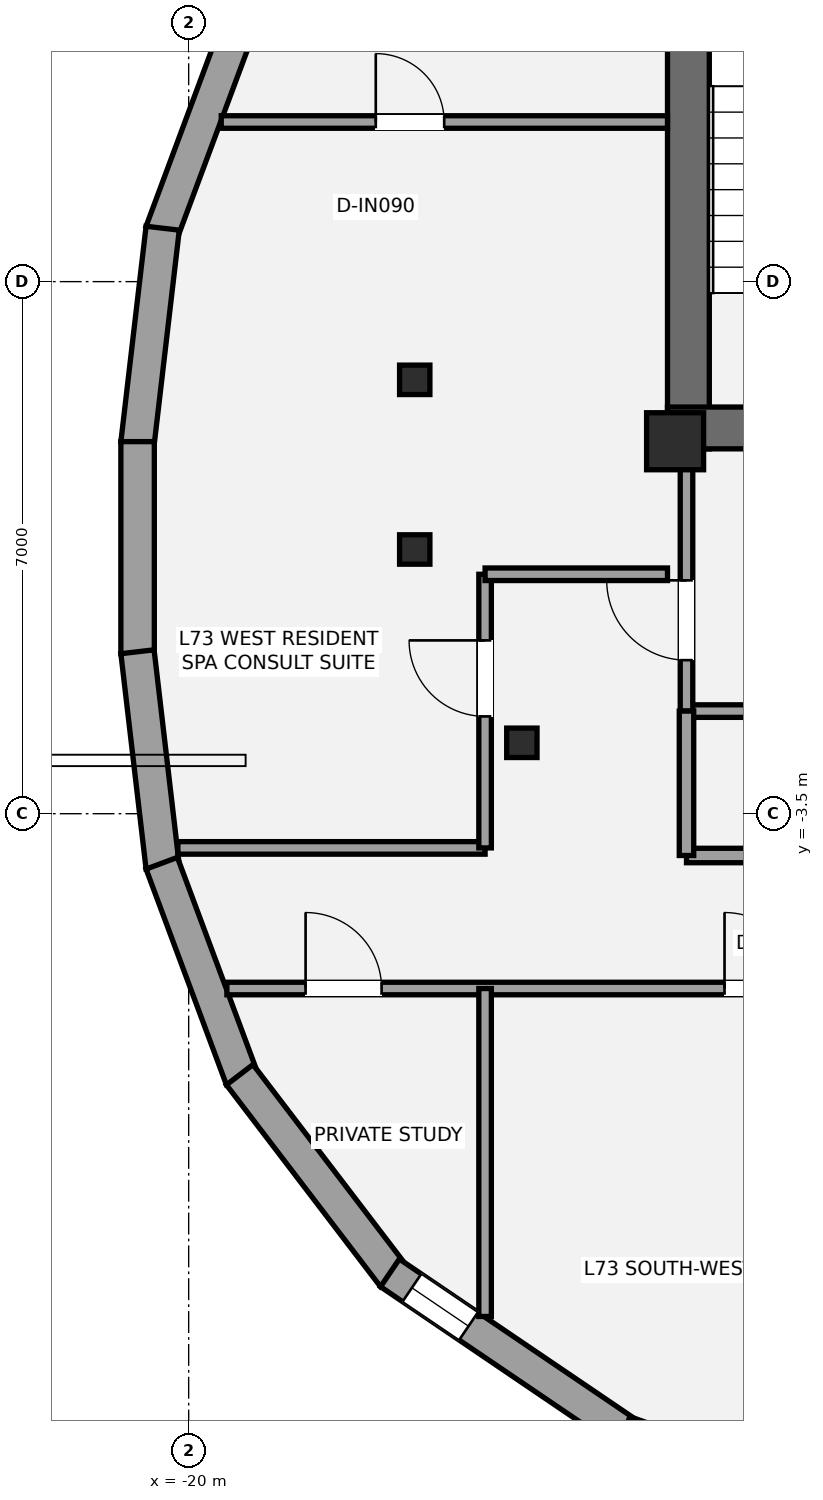
"""IFC4 building model, lengths in metres.
Left out: names, types, materials, properties, quantities, classifications, styles, units other than length and angle.
Written with IfcOpenShell. Run it as: python <this file> out.ifc"""

import sys

from ifc_helpers import new_model, si_unit, direction, frame, frame_2d, origin, origin_2d, place, context, subcontext, project, spatial, rectangle, i_section, extrude, element, fill, save


model = new_model("IFC4")
c1 = context("Model", 3, precision=1e-05, world=origin(), true_north=direction((0.0, 1.0)))
c2 = subcontext(c1, "Body", "Model", "MODEL_VIEW")
j1 = project(units=[si_unit("LENGTHUNIT", "METRE"), si_unit("PLANEANGLEUNIT", "RADIAN")], contexts=[c1])
p1 = place(None, origin())
s1 = spatial("IfcSite", under=j1, at=p1, CompositionType="ELEMENT")
p2 = place(p1, origin())
s2 = spatial("IfcBuilding", under=s1, at=p2, CompositionType="ELEMENT")
p3 = place(p2, frame((0.0, 0.0, 257.25)))
s3 = spatial("IfcBuildingStorey", under=s2, at=p3, CompositionType="ELEMENT", Elevation=257.25)
p4 = place(p3, frame((-13.425, 1.3, 0.0), z_axis=(0.0, 0.0, 1.0), x_axis=(0.0, 1.0, 0.0)))
e1 = element("IfcWall", 1, at=p4, inside=s3, PredefinedType="SHEAR", context=c2, shape_type="SweptSolid", body=[
    extrude(rectangle(XDim=8.25, YDim=0.55, at=frame_2d((4.125, 0.0))), origin(), (0.0, 0.0, 1.0), 3.15),
])
p5 = place(p3, frame((-4.925, 1.575, 0.0), z_axis=(0.0, 0.0, 1.0), x_axis=(-1.0, 0.0, 0.0)))
e2 = element("IfcWall", 2, at=p5, inside=s3, PredefinedType="SHEAR", context=c2, shape_type="SweptSolid", body=[
    extrude(rectangle(XDim=8.775, YDim=0.55, at=frame_2d((4.387, 0.0))), origin(), (0.0, 0.0, 1.0), 3.15),
])
p6 = place(p5, frame((5.375, 0.0, 0.0)))
e3 = element("IfcOpeningElement", 3, at=p6, cuts=e2, PredefinedType="OPENING", context=c2, shape_type="SweptSolid", body=[
    extrude(rectangle(XDim=1.05, YDim=2.15, at=frame_2d((0.525, 1.075))), frame((0.0, 0.285, 0.0), z_axis=(0.0, -1.0, 0.0), x_axis=(1.0, 0.0, 0.0)), (0.0, 0.0, 1.0), 0.57),
])
p7 = place(p5, frame((3.705, 0.0, 0.0)))
e4 = element("IfcOpeningElement", 4, at=p7, cuts=e2, PredefinedType="OPENING", context=c2, shape_type="SweptSolid", body=[
    extrude(rectangle(XDim=1.1, YDim=2.2, at=frame_2d((0.55, 1.1))), frame((0.0, 0.285, 0.0), z_axis=(0.0, -1.0, 0.0), x_axis=(1.0, 0.0, 0.0)), (0.0, 0.0, 1.0), 0.57),
])
p8 = place(p3, frame((-13.6, 1.4, 0.0), z_axis=(0.0, 0.0, 1.0), x_axis=(1.0, 0.0, 0.0)))
e5 = element("IfcColumn", 5, at=p8, inside=s3, PredefinedType="PILASTER", context=c2, shape_type="SweptSolid", body=[
    extrude(rectangle(XDim=0.75, YDim=0.75, at=origin_2d()), origin(), (0.0, 0.0, 1.0), 3.15),
])
for number, where, z_axis, x_axis in (
    (6, (-17.026, 2.208, 0.0), (0.0, 0.0, 1.0), (1.0, 0.0, 0.0)),
    (7, (-17.026, -0.024, 0.0), (0.0, 0.0, 1.0), (1.0, 0.0, 0.0)),
    (8, (-15.616, -2.567, 0.0), (0.0, 0.0, 1.0), (1.0, 0.0, 0.0)),
):
    element("IfcColumn", number, at=place(p3, frame(where, z_axis=z_axis, x_axis=x_axis)), inside=s3, PredefinedType="COLUMN", context=c2, shape_type="SweptSolid", body=[
        extrude(i_section(OverallWidth=0.399, OverallDepth=0.387, WebThickness=0.021, FlangeThickness=0.033, at=origin_2d()), origin(), (0.0, 0.0, 1.0), 3.15),
    ])
p9 = place(p3, frame((-20.354, 4.152, 0.0), z_axis=(0.0, 0.0, 1.0), x_axis=(0.34898554078, 0.937128108813, 0.0)))
e9 = element("IfcWall", 9, at=p9, inside=s3, PredefinedType="STANDARD", context=c2, shape_type="SweptSolid", body=[
    extrude(rectangle(XDim=3.03, YDim=0.44, at=frame_2d((1.515, 0.0))), origin(), (0.0, 0.0, 1.0), 2.296),
])
p10 = place(p3, frame((-20.674, 1.369, 0.0), z_axis=(0.0, 0.0, 1.0), x_axis=(0.116300017341, 0.99321412896, 0.0)))
e10 = element("IfcWall", 10, at=p10, inside=s3, PredefinedType="STANDARD", context=c2, shape_type="SweptSolid", body=[
    extrude(rectangle(XDim=2.853, YDim=0.44, at=frame_2d((1.426, 0.0))), origin(), (0.0, 0.0, 1.0), 2.296),
])
p11 = place(p3, frame((-20.672, -1.395, 0.0), z_axis=(0.0, 0.0, 1.0), x_axis=(0.0, 1.0, 0.0)))
e11 = element("IfcWall", 11, at=p11, inside=s3, PredefinedType="STANDARD", context=c2, shape_type="SweptSolid", body=[
    extrude(rectangle(XDim=2.79, YDim=0.44, at=frame_2d((1.395, 0.0))), origin(), (0.0, 0.0, 1.0), 2.296),
])
p12 = place(p3, frame((-20.342, -4.203, 0.0), z_axis=(0.0, 0.0, 1.0), x_axis=(-0.116300017341, 0.99321412896, 0.0)))
e12 = element("IfcWall", 12, at=p12, inside=s3, PredefinedType="STANDARD", context=c2, shape_type="SweptSolid", body=[
    extrude(rectangle(XDim=2.853, YDim=0.44, at=frame_2d((1.426, 0.0))), origin(), (0.0, 0.0, 1.0), 2.296),
])
p13 = place(p3, frame((-19.297, -6.991, 0.0), z_axis=(0.0, 0.0, 1.0), x_axis=(-0.34898554078, 0.937128108813, 0.0)))
e13 = element("IfcWall", 13, at=p13, inside=s3, PredefinedType="STANDARD", context=c2, shape_type="SweptSolid", body=[
    extrude(rectangle(XDim=3.03, YDim=0.44, at=frame_2d((1.515, 0.0))), origin(), (0.0, 0.0, 1.0), 2.296),
])
p14 = place(p3, frame((-17.301, -9.59, 0.0), z_axis=(0.0, 0.0, 1.0), x_axis=(-0.606828844818, 0.794832531479, 0.0)))
e14 = element("IfcWall", 14, at=p14, inside=s3, PredefinedType="STANDARD", context=c2, shape_type="SweptSolid", body=[
    extrude(rectangle(XDim=3.341, YDim=0.44, at=frame_2d((1.671, 0.0))), origin(), (0.0, 0.0, 1.0), 2.296),
])
p15 = place(p3, frame((-14.218, -11.666, 0.0), z_axis=(0.0, 0.0, 1.0), x_axis=(-0.827669406477, 0.561215959842, 0.0)))
e15 = element("IfcWall", 15, at=p15, inside=s3, PredefinedType="STANDARD", context=c2, shape_type="SweptSolid", body=[
    extrude(rectangle(XDim=3.786, YDim=0.44, at=frame_2d((1.893, 0.0))), origin(), (0.0, 0.0, 1.0), 2.296),
])
p16 = place(p15, frame((2.537, 0.0, 0.58)))
e16 = element("IfcOpeningElement", 16, at=p16, cuts=e15, PredefinedType="OPENING", context=c2, shape_type="SweptSolid", body=[
    extrude(rectangle(XDim=0.9, YDim=1.35, at=frame_2d((0.45, 0.675))), frame((0.0, 0.23, 0.0), z_axis=(0.0, -1.0, 0.0), x_axis=(1.0, 0.0, 0.0)), (0.0, 0.0, 1.0), 0.46),
])
p17 = place(p3, frame((-10.352, -13.015, 0.0), z_axis=(0.0, 0.0, 1.0), x_axis=(-0.943571934891, 0.331167636834, 0.0)))
e17 = element("IfcWall", 17, at=p17, inside=s3, PredefinedType="STANDARD", context=c2, shape_type="SweptSolid", body=[
    extrude(rectangle(XDim=4.151, YDim=0.44, at=frame_2d((2.076, 0.0))), origin(), (0.0, 0.0, 1.0), 2.296),
])
p18 = place(p17, frame((2.805, 0.0, 0.58)))
e18 = element("IfcOpeningElement", 18, at=p18, cuts=e17, PredefinedType="OPENING", context=c2, shape_type="SweptSolid", body=[
    extrude(rectangle(XDim=0.9, YDim=1.35, at=frame_2d((0.45, 0.675))), frame((0.0, 0.23, 0.0), z_axis=(0.0, -1.0, 0.0), x_axis=(1.0, 0.0, 0.0)), (0.0, 0.0, 1.0), 0.46),
])
p19 = place(p3, frame((-13.45, -2.15, 0.0), z_axis=(0.0, 0.0, 1.0), x_axis=(1.0, 0.0, 0.0)))
e19 = element("IfcWall", 19, at=p19, inside=s3, PredefinedType="PARTITIONING", context=c2, shape_type="SweptSolid", body=[
    extrude(rectangle(XDim=6.25, YDim=0.165, at=frame_2d((3.125, 0.0))), origin(), (0.0, 0.0, 1.0), 2.383),
])
p20 = place(p3, frame((-13.45, -2.15, 0.0), z_axis=(0.0, 0.0, 1.0), x_axis=(0.0, 1.0, 0.0)))
e20 = element("IfcWall", 20, at=p20, inside=s3, PredefinedType="PARTITIONING", context=c2, shape_type="SweptSolid", body=[
    extrude(rectangle(XDim=3.5, YDim=0.165, at=frame_2d((1.75, 0.0))), origin(), (0.0, 0.0, 1.0), 2.383),
])
p21 = place(p20, frame((0.67, 0.0, 0.0)))
e21 = element("IfcOpeningElement", 21, at=p21, cuts=e20, PredefinedType="OPENING", context=c2, shape_type="SweptSolid", body=[
    extrude(rectangle(XDim=1.05, YDim=2.15, at=frame_2d((0.525, 1.075))), frame((0.0, 0.093, 0.0), z_axis=(0.0, -1.0, 0.0), x_axis=(1.0, 0.0, 0.0)), (0.0, 0.0, 1.0), 0.185),
])
p22 = place(p3, frame((-13.45, -4.05, 0.0), z_axis=(0.0, 0.0, 1.0), x_axis=(1.0, 0.0, 0.0)))
e22 = element("IfcWall", 22, at=p22, inside=s3, PredefinedType="PLUMBINGWALL", context=c2, shape_type="SweptSolid", body=[
    extrude(rectangle(XDim=11.35, YDim=0.19, at=frame_2d((5.675, 0.0))), origin(), (0.0, 0.0, 1.0), 2.317),
])
p23 = place(p22, frame((1.25, 0.0, 0.0)))
e23 = element("IfcOpeningElement", 23, at=p23, cuts=e22, PredefinedType="OPENING", context=c2, shape_type="SweptSolid", body=[
    extrude(rectangle(XDim=0.95, YDim=2.15, at=frame_2d((0.475, 1.075))), frame((0.0, 0.105, 0.0), z_axis=(0.0, -1.0, 0.0), x_axis=(1.0, 0.0, 0.0)), (0.0, 0.0, 1.0), 0.21),
])
p24 = place(p22, frame((6.16, 0.0, 0.0)))
e24 = element("IfcOpeningElement", 24, at=p24, cuts=e22, PredefinedType="OPENING", context=c2, shape_type="SweptSolid", body=[
    extrude(rectangle(XDim=0.9, YDim=2.1, at=frame_2d((0.45, 1.05))), frame((0.0, 0.105, 0.0), z_axis=(0.0, -1.0, 0.0), x_axis=(1.0, 0.0, 0.0)), (0.0, 0.0, 1.0), 0.21),
])
p25 = place(p3, frame((-13.45, -4.05, 0.0), z_axis=(0.0, 0.0, 1.0), x_axis=(0.0, 1.0, 0.0)))
e25 = element("IfcWall", 25, at=p25, inside=s3, PredefinedType="PLUMBINGWALL", context=c2, shape_type="SweptSolid", body=[
    extrude(rectangle(XDim=1.9, YDim=0.19, at=frame_2d((0.95, 0.0))), origin(), (0.0, 0.0, 1.0), 2.383),
])
p26 = place(p3, frame((-19.497, -5.8, 0.0), z_axis=(0.0, 0.0, 1.0), x_axis=(1.0, 0.0, 0.0)))
e26 = element("IfcWall", 26, at=p26, inside=s3, PredefinedType="PARTITIONING", context=c2, shape_type="SweptSolid", body=[
    extrude(rectangle(XDim=38.994, YDim=0.165, at=frame_2d((19.497, 0.0))), origin(), (0.0, 0.0, 1.0), 2.383),
])
p27 = place(p26, frame((1.035, 0.0, 0.0)))
e27 = element("IfcOpeningElement", 27, at=p27, cuts=e26, PredefinedType="OPENING", context=c2, shape_type="SweptSolid", body=[
    extrude(rectangle(XDim=1.0, YDim=2.15, at=frame_2d((0.5, 1.075))), frame((0.0, 0.093, 0.0), z_axis=(0.0, -1.0, 0.0), x_axis=(1.0, 0.0, 0.0)), (0.0, 0.0, 1.0), 0.185),
])
p28 = place(p26, frame((36.719, 0.0, 0.0)))
e28 = element("IfcOpeningElement", 28, at=p28, cuts=e26, PredefinedType="OPENING", context=c2, shape_type="SweptSolid", body=[
    extrude(rectangle(XDim=1.0, YDim=2.15, at=frame_2d((0.5, 1.075))), frame((0.0, 0.093, 0.0), z_axis=(0.0, -1.0, 0.0), x_axis=(1.0, 0.0, 0.0)), (0.0, 0.0, 1.0), 0.185),
])
p29 = place(p26, frame((6.548, 0.0, 0.0)))
e29 = element("IfcOpeningElement", 29, at=p29, cuts=e26, PredefinedType="OPENING", context=c2, shape_type="SweptSolid", body=[
    extrude(rectangle(XDim=1.0, YDim=2.15, at=frame_2d((0.5, 1.075))), frame((0.0, 0.093, 0.0), z_axis=(0.0, -1.0, 0.0), x_axis=(1.0, 0.0, 0.0)), (0.0, 0.0, 1.0), 0.185),
])
p30 = place(p26, frame((13.778, 0.0, 0.0)))
e30 = element("IfcOpeningElement", 30, at=p30, cuts=e26, PredefinedType="OPENING", context=c2, shape_type="SweptSolid", body=[
    extrude(rectangle(XDim=1.0, YDim=2.15, at=frame_2d((0.5, 1.075))), frame((0.0, 0.093, 0.0), z_axis=(0.0, -1.0, 0.0), x_axis=(1.0, 0.0, 0.0)), (0.0, 0.0, 1.0), 0.185),
])
p31 = place(p26, frame((19.397, 0.0, 0.0)))
e31 = element("IfcOpeningElement", 31, at=p31, cuts=e26, PredefinedType="OPENING", context=c2, shape_type="SweptSolid", body=[
    extrude(rectangle(XDim=1.0, YDim=2.15, at=frame_2d((0.5, 1.075))), frame((0.0, 0.093, 0.0), z_axis=(0.0, -1.0, 0.0), x_axis=(1.0, 0.0, 0.0)), (0.0, 0.0, 1.0), 0.185),
])
p32 = place(p26, frame((26.018, 0.0, 0.0)))
e32 = element("IfcOpeningElement", 32, at=p32, cuts=e26, PredefinedType="OPENING", context=c2, shape_type="SweptSolid", body=[
    extrude(rectangle(XDim=1.0, YDim=2.15, at=frame_2d((0.5, 1.075))), frame((0.0, 0.093, 0.0), z_axis=(0.0, -1.0, 0.0), x_axis=(1.0, 0.0, 0.0)), (0.0, 0.0, 1.0), 0.185),
])
p33 = place(p26, frame((31.647, 0.0, 0.0)))
e33 = element("IfcOpeningElement", 33, at=p33, cuts=e26, PredefinedType="OPENING", context=c2, shape_type="SweptSolid", body=[
    extrude(rectangle(XDim=1.0, YDim=2.15, at=frame_2d((0.5, 1.075))), frame((0.0, 0.093, 0.0), z_axis=(0.0, -1.0, 0.0), x_axis=(1.0, 0.0, 0.0)), (0.0, 0.0, 1.0), 0.185),
])
p34 = place(p3, frame((-20.142, -3.95, 0.0), z_axis=(0.0, 0.0, 1.0), x_axis=(1.0, 0.0, 0.0)))
e34 = element("IfcWall", 34, at=p34, inside=s3, PredefinedType="PARTITIONING", context=c2, shape_type="SweptSolid", body=[
    extrude(rectangle(XDim=4.042, YDim=0.165, at=frame_2d((2.021, 0.0))), origin(), (0.0, 0.0, 1.0), 2.383),
])
p35 = place(p3, frame((-16.1, -3.95, 0.0), z_axis=(0.0, 0.0, 1.0), x_axis=(0.0, 1.0, 0.0)))
e35 = element("IfcWall", 35, at=p35, inside=s3, PredefinedType="PARTITIONING", context=c2, shape_type="SweptSolid", body=[
    extrude(rectangle(XDim=3.6, YDim=0.165, at=frame_2d((1.8, 0.0))), origin(), (0.0, 0.0, 1.0), 2.317),
])
p36 = place(p35, frame((1.73, 0.0, 0.0)))
e36 = element("IfcOpeningElement", 36, at=p36, cuts=e35, PredefinedType="OPENING", context=c2, shape_type="SweptSolid", body=[
    extrude(rectangle(XDim=1.0, YDim=2.15, at=frame_2d((0.5, 1.075))), frame((0.0, 0.093, 0.0), z_axis=(0.0, -1.0, 0.0), x_axis=(1.0, 0.0, 0.0)), (0.0, 0.0, 1.0), 0.185),
])
p37 = place(p3, frame((-16.1, -0.35, 0.0), z_axis=(0.0, 0.0, 1.0), x_axis=(1.0, 0.0, 0.0)))
e37 = element("IfcWall", 37, at=p37, inside=s3, PredefinedType="PARTITIONING", context=c2, shape_type="SweptSolid", body=[
    extrude(rectangle(XDim=2.4, YDim=0.165, at=frame_2d((1.2, 0.0))), origin(), (0.0, 0.0, 1.0), 2.383),
])
p38 = place(p3, frame((-19.572, 5.6, 0.0), z_axis=(0.0, 0.0, 1.0), x_axis=(1.0, 0.0, 0.0)))
e38 = element("IfcWall", 38, at=p38, inside=s3, PredefinedType="PARTITIONING", context=c2, shape_type="SweptSolid", body=[
    extrude(rectangle(XDim=5.872, YDim=0.165, at=frame_2d((2.936, 0.0))), origin(), (0.0, 0.0, 1.0), 2.383),
])
p39 = place(p38, frame((2.033, 0.0, 0.0)))
e39 = element("IfcOpeningElement", 39, at=p39, cuts=e38, PredefinedType="OPENING", context=c2, shape_type="SweptSolid", body=[
    extrude(rectangle(XDim=0.9, YDim=2.1, at=frame_2d((0.45, 1.05))), frame((0.0, 0.093, 0.0), z_axis=(0.0, -1.0, 0.0), x_axis=(1.0, 0.0, 0.0)), (0.0, 0.0, 1.0), 0.185),
])
p40 = place(p3, frame((-16.1, -10.115, 0.0), z_axis=(0.0, 0.0, 1.0), x_axis=(0.0, 1.0, 0.0)))
e40 = element("IfcWall", 40, at=p40, inside=s3, PredefinedType="PARTITIONING", context=c2, shape_type="SweptSolid", body=[
    extrude(rectangle(XDim=4.314, YDim=0.165, at=frame_2d((2.157, 0.0))), origin(), (0.0, 0.0, 1.0), 2.383),
])
p41 = place(p16, origin())
e41 = element("IfcWindow", 41, at=p41, inside=s3, PartitioningType="SINGLE_PANEL", PredefinedType="WINDOW", context=c2, shape_type="SweptSolid", body=[
    extrude(rectangle(XDim=0.9, YDim=1.35, at=frame_2d((0.45, 0.675))), frame((0.0, -0.01, 0.0), z_axis=(0.0, -1.0, 0.0), x_axis=(1.0, 0.0, 0.0)), (0.0, 0.0, 1.0), 0.06),
])
fill(e16, e41)
p42 = place(p21, origin())
e42 = element("IfcDoor", 42, at=p42, inside=s3, OperationType="SINGLE_SWING_RIGHT", PredefinedType="DOOR", context=c2, shape_type="SweptSolid", body=[
    extrude(rectangle(XDim=1.05, YDim=2.15, at=frame_2d((0.525, 1.075))), frame((0.0, 0.025, 0.0), z_axis=(0.0, -1.0, 0.0), x_axis=(1.0, 0.0, 0.0)), (0.0, 0.0, 1.0), 0.05),
])
fill(e21, e42)
p43 = place(p27, origin())
e43 = element("IfcDoor", 43, at=p43, inside=s3, OperationType="SINGLE_SWING_LEFT", PredefinedType="DOOR", context=c2, shape_type="SweptSolid", body=[
    extrude(rectangle(XDim=1.0, YDim=2.15, at=frame_2d((0.5, 1.075))), frame((0.0, 0.025, 0.0), z_axis=(0.0, -1.0, 0.0), x_axis=(1.0, 0.0, 0.0)), (0.0, 0.0, 1.0), 0.05),
])
fill(e27, e43)
p44 = place(p29, origin())
e44 = element("IfcDoor", 44, at=p44, inside=s3, OperationType="SINGLE_SWING_LEFT", PredefinedType="DOOR", context=c2, shape_type="SweptSolid", body=[
    extrude(rectangle(XDim=1.0, YDim=2.15, at=frame_2d((0.5, 1.075))), frame((0.0, 0.025, 0.0), z_axis=(0.0, -1.0, 0.0), x_axis=(1.0, 0.0, 0.0)), (0.0, 0.0, 1.0), 0.05),
])
fill(e29, e44)
p45 = place(p36, origin())
e45 = element("IfcDoor", 45, at=p45, inside=s3, OperationType="SINGLE_SWING_RIGHT", PredefinedType="DOOR", context=c2, shape_type="SweptSolid", body=[
    extrude(rectangle(XDim=1.0, YDim=2.15, at=frame_2d((0.5, 1.075))), frame((0.0, 0.025, 0.0), z_axis=(0.0, -1.0, 0.0), x_axis=(1.0, 0.0, 0.0)), (0.0, 0.0, 1.0), 0.05),
])
fill(e36, e45)
p46 = place(p39, origin())
e46 = element("IfcDoor", 46, at=p46, inside=s3, OperationType="SINGLE_SWING_LEFT", PredefinedType="DOOR", context=c2, shape_type="SweptSolid", body=[
    extrude(rectangle(XDim=0.9, YDim=2.1, at=frame_2d((0.45, 1.05))), frame((0.0, 0.025, 0.0), z_axis=(0.0, -1.0, 0.0), x_axis=(1.0, 0.0, 0.0)), (0.0, 0.0, 1.0), 0.05),
])
fill(e39, e46)
save(model, sys.argv[1])
